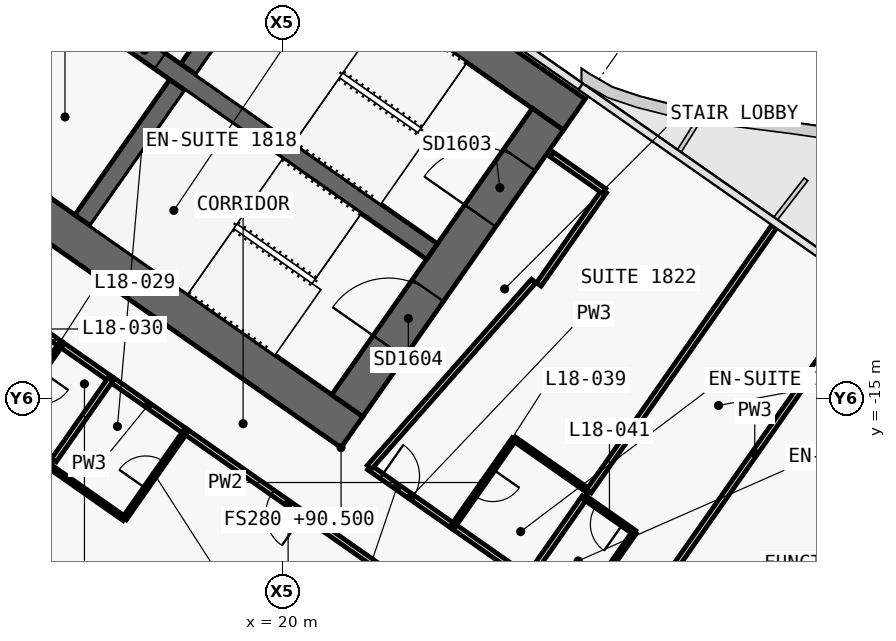
"""IFC4 building model, lengths in metres.
Left out: names, types, materials, properties, quantities, classifications, styles, units other than length and angle.
Written with IfcOpenShell. Run it as: python <this file> out.ifc"""

import sys

from ifc_helpers import new_model, si_unit, direction, frame, frame_2d, origin, place, context, subcontext, project, spatial, polyline, rectangle, outline, extrude, element, fill, save


model = new_model("IFC4")
c1 = context("Model", 3, precision=1e-05, world=origin(), true_north=direction((0.0, 1.0)))
c2 = subcontext(c1, "Body", "Model", "MODEL_VIEW")
j1 = project(units=[si_unit("LENGTHUNIT", "METRE"), si_unit("PLANEANGLEUNIT", "RADIAN")], contexts=[c1])
p1 = place(None, origin())
s1 = spatial("IfcSite", under=j1, at=p1, CompositionType="ELEMENT")
p2 = place(p1, origin())
s2 = spatial("IfcBuilding", under=s1, at=p2, CompositionType="ELEMENT")
p3 = place(p2, frame((0.0, 0.0, 90.5)))
s3 = spatial("IfcBuildingStorey", under=s2, at=p3, CompositionType="ELEMENT", Elevation=90.5)
p4 = place(p3, frame((-0.037, 11.867, 0.0), z_axis=(0.0, 0.0, 1.0), x_axis=(0.819155306259, -0.573571777746, 0.0)))
e1 = element("IfcWall", 1, at=p4, inside=s3, PredefinedType="SHEAR", context=c2, shape_type="SweptSolid", body=[
    extrude(outline(polyline([(33.837, 0.5), (0.0, 0.5), (0.7, -0.5), (33.837, -0.5), (33.837, 0.5)])), origin(), (0.0, 0.0, 1.0), 3.6),
])
p5 = place(p3, frame((-0.037, -0.585, 0.0), z_axis=(0.0, 0.0, 1.0), x_axis=(0.819157152511, -0.573569140985, 0.0)))
e2 = element("IfcWall", 2, at=p5, inside=s3, PredefinedType="SHEAR", context=c2, shape_type="SweptSolid", body=[
    extrude(outline(polyline([(26.695, 0.5), (0.0, 0.5), (0.7, -0.5), (26.695, -0.5), (26.695, 0.5)])), origin(), (0.0, 0.0, 1.0), 3.6),
])
p6 = place(p5, frame((1.045, 0.0, 0.0)))
e3 = element("IfcOpeningElement", 3, at=p6, cuts=e2, PredefinedType="OPENING", context=c2, shape_type="SweptSolid", body=[
    extrude(rectangle(XDim=1.5, YDim=2.1, at=frame_2d((0.75, 1.05))), frame((0.0, 0.51, 0.0), z_axis=(0.0, -1.0, 0.0), x_axis=(1.0, 0.0, 0.0)), (0.0, 0.0, 1.0), 1.02),
])
p7 = place(p5, frame((12.445, 0.0, 0.0)))
e4 = element("IfcOpeningElement", 4, at=p7, cuts=e2, PredefinedType="OPENING", context=c2, shape_type="SweptSolid", body=[
    extrude(rectangle(XDim=1.5, YDim=2.1, at=frame_2d((0.75, 1.05))), frame((0.0, 0.51, 0.0), z_axis=(0.0, -1.0, 0.0), x_axis=(1.0, 0.0, 0.0)), (0.0, 0.0, 1.0), 1.02),
])
p8 = place(p3, frame((21.708, -15.2, 0.0), z_axis=(0.0, 0.0, 1.0), x_axis=(0.573576324356, 0.819152122709, 0.0)))
e5 = element("IfcWall", 5, at=p8, inside=s3, PredefinedType="SHEAR", context=c2, shape_type="SweptSolid", body=[
    extrude(outline(polyline([(9.2, 0.5), (0.0, 0.5), (0.0, -0.5), (9.2, -0.5), (9.2, 0.5)])), origin(), (0.0, 0.0, 1.0), 3.6),
])
p9 = place(p8, frame((6.1, 0.0, 0.0)))
e6 = element("IfcOpeningElement", 6, at=p9, cuts=e5, PredefinedType="OPENING", context=c2, shape_type="SweptSolid", body=[
    extrude(rectangle(XDim=1.8, YDim=2.1, at=frame_2d((0.9, 1.05))), frame((0.0, 0.51, 0.0), z_axis=(0.0, -1.0, 0.0), x_axis=(1.0, 0.0, 0.0)), (0.0, 0.0, 1.0), 1.02),
])
p10 = place(p8, frame((1.9, 0.0, 0.0)))
e7 = element("IfcOpeningElement", 7, at=p10, cuts=e5, PredefinedType="OPENING", context=c2, shape_type="SweptSolid", body=[
    extrude(rectangle(XDim=1.8, YDim=2.1, at=frame_2d((0.9, 1.05))), frame((0.0, 0.51, 0.0), z_axis=(0.0, -1.0, 0.0), x_axis=(1.0, 0.0, 0.0)), (0.0, 0.0, 1.0), 1.02),
])
p11 = place(p3, frame((14.745, -10.324, 0.0), z_axis=(0.0, 0.0, 1.0), x_axis=(0.57356780395, 0.819158088694, 0.0)))
e8 = element("IfcWall", 8, at=p11, inside=s3, PredefinedType="SHEAR", context=c2, shape_type="SweptSolid", body=[
    extrude(outline(polyline([(0.0, 0.25), (0.0, -0.25), (4.35, -0.25), (4.35, 0.25), (0.0, 0.25)])), origin(), (0.0, 0.0, 1.0), 3.6),
])
p12 = place(p3, frame((17.527, -6.352, 0.0), z_axis=(0.0, 0.0, 1.0), x_axis=(0.573530143085, 0.819184457233, 0.0)))
e9 = element("IfcWall", 9, at=p12, inside=s3, PredefinedType="SHEAR", context=c2, shape_type="SweptSolid", body=[
    extrude(outline(polyline([(4.35, -0.25), (4.35, 0.25), (0.0, 0.25), (0.0, -0.25), (4.35, -0.25)])), origin(), (0.0, 0.0, 1.0), 3.6),
])
p13 = place(p3, frame((2.638, 3.768, 0.0), z_axis=(0.0, 0.0, 1.0), x_axis=(0.819148977158, -0.573580816643, 0.0)))
e10 = element("IfcWall", 10, at=p13, inside=s3, PredefinedType="SHEAR", context=c2, shape_type="SweptSolid", body=[
    extrude(outline(polyline([(0.0, 0.25), (0.0, -0.25), (26.0, -0.25), (26.0, 0.25), (0.0, 0.25)])), origin(), (0.0, 0.0, 1.0), 3.6),
])
p14 = place(p13, frame((9.637, 0.0, 0.0)))
e11 = element("IfcOpeningElement", 11, at=p14, cuts=e10, PredefinedType="OPENING", context=c2, shape_type="SweptSolid", body=[
    extrude(rectangle(XDim=1.2, YDim=2.1, at=frame_2d((0.6, 1.05))), frame((0.0, 0.26, 0.0), z_axis=(0.0, -1.0, 0.0), x_axis=(1.0, 0.0, 0.0)), (0.0, 0.0, 1.0), 0.52),
])
p15 = place(p13, frame((11.812, 0.0, 0.0)))
e12 = element("IfcOpeningElement", 12, at=p15, cuts=e10, PredefinedType="OPENING", context=c2, shape_type="SweptSolid", body=[
    extrude(rectangle(XDim=1.2, YDim=2.1, at=frame_2d((0.6, 1.05))), frame((0.0, 0.26, 0.0), z_axis=(0.0, -1.0, 0.0), x_axis=(1.0, 0.0, 0.0)), (0.0, 0.0, 1.0), 0.52),
])
p16 = place(p13, frame((13.988, 0.0, 0.0)))
e13 = element("IfcOpeningElement", 13, at=p16, cuts=e10, PredefinedType="OPENING", context=c2, shape_type="SweptSolid", body=[
    extrude(rectangle(XDim=1.2, YDim=2.1, at=frame_2d((0.6, 1.05))), frame((0.0, 0.26, 0.0), z_axis=(0.0, -1.0, 0.0), x_axis=(1.0, 0.0, 0.0)), (0.0, 0.0, 1.0), 0.52),
])
p17 = place(p13, frame((16.262, 0.0, 0.0)))
e14 = element("IfcOpeningElement", 14, at=p17, cuts=e10, PredefinedType="OPENING", context=c2, shape_type="SweptSolid", body=[
    extrude(rectangle(XDim=1.0, YDim=2.1, at=frame_2d((0.5, 1.05))), frame((0.0, 0.26, 0.0), z_axis=(0.0, -1.0, 0.0), x_axis=(1.0, 0.0, 0.0)), (0.0, 0.0, 1.0), 0.52),
])
p18 = place(p3, frame((22.284, -16.824, 0.0), z_axis=(0.0, 0.0, 1.0), x_axis=(0.819176640776, -0.573541307325, 0.0)))
e15 = element("IfcWall", 15, at=p18, inside=s3, PredefinedType="PARTITIONING", context=c2, shape_type="SweptSolid", body=[
    extrude(rectangle(XDim=2.698, YDim=0.15, at=frame_2d((1.349, 0.0))), origin(), (0.0, 0.0, 1.0), 3.32),
])
p19 = place(p18, frame((0.396, 0.0, 0.0)))
e16 = element("IfcOpeningElement", 16, at=p19, cuts=e15, PredefinedType="OPENING", context=c2, shape_type="SweptSolid", body=[
    extrude(rectangle(XDim=1.0, YDim=2.1, at=frame_2d((0.5, 1.05))), frame((0.0, 0.085, 0.0), z_axis=(0.0, -1.0, 0.0), x_axis=(1.0, 0.0, 0.0)), (0.0, 0.0, 1.0), 0.17),
])
p20 = place(p3, frame((24.491, -18.369, 0.0), z_axis=(0.0, 0.0, 1.0), x_axis=(0.819179439794, -0.573537309527, 0.0)))
e17 = element("IfcWall", 17, at=p20, inside=s3, PredefinedType="PARTITIONING", context=c2, shape_type="SweptSolid", body=[
    extrude(rectangle(XDim=2.404, YDim=0.15, at=frame_2d((1.202, 0.0))), origin(), (0.0, 0.0, 1.0), 3.32),
])
p21 = place(p3, frame((14.172, -13.585, 0.0), z_axis=(0.0, 0.0, 1.0), x_axis=(-0.81914197737, 0.573590813132, 0.0)))
e18 = element("IfcWall", 18, at=p21, inside=s3, PredefinedType="PARTITIONING", context=c2, shape_type="SweptSolid", body=[
    extrude(rectangle(XDim=1.403, YDim=0.15, at=frame_2d((0.701, 0.0))), origin(), (0.0, 0.0, 1.0), 2.6),
])
p22 = place(p21, frame((0.201, 0.0, 0.0)))
e19 = element("IfcOpeningElement", 19, at=p22, cuts=e18, PredefinedType="OPENING", context=c2, shape_type="SweptSolid", body=[
    extrude(rectangle(XDim=1.0, YDim=2.1, at=frame_2d((0.5, 1.05))), frame((0.0, 0.085, 0.0), z_axis=(0.0, -1.0, 0.0), x_axis=(1.0, 0.0, 0.0)), (0.0, 0.0, 1.0), 0.17),
])
p23 = place(p3, frame((15.483, -14.504, 0.0), z_axis=(0.0, 0.0, 1.0), x_axis=(-0.819189013667, 0.573523634986, 0.0)))
e20 = element("IfcWall", 20, at=p23, inside=s3, PredefinedType="PARTITIONING", context=c2, shape_type="SweptSolid", body=[
    extrude(rectangle(XDim=1.604, YDim=0.15, at=frame_2d((0.802, 0.0))), origin(), (0.0, 0.0, 1.0), 3.32),
])
p24 = place(p3, frame((22.855, -19.666, 0.0), z_axis=(0.0, 0.0, 1.0), x_axis=(-0.819153746897, 0.573574004767, 0.0)))
e21 = element("IfcWall", 21, at=p24, inside=s3, PredefinedType="PARTITIONING", context=c2, shape_type="SweptSolid", body=[
    extrude(rectangle(XDim=6.603, YDim=0.15, at=frame_2d((3.302, 0.0))), origin(), (0.0, 0.0, 1.0), 2.6),
])
p25 = place(p24, frame((2.802, 0.0, 0.0)))
e22 = element("IfcOpeningElement", 22, at=p25, cuts=e21, PredefinedType="OPENING", context=c2, shape_type="SweptSolid", body=[
    extrude(rectangle(XDim=1.0, YDim=2.1, at=frame_2d((0.5, 1.05))), frame((0.0, 0.085, 0.0), z_axis=(0.0, -1.0, 0.0), x_axis=(1.0, 0.0, 0.0)), (0.0, 0.0, 1.0), 0.17),
])
p26 = place(p3, frame((17.449, -15.88, 0.0), z_axis=(0.0, 0.0, 1.0), x_axis=(-0.819179439794, 0.573537309527, 0.0)))
e23 = element("IfcWall", 23, at=p26, inside=s3, PredefinedType="PARTITIONING", context=c2, shape_type="SweptSolid", body=[
    extrude(rectangle(XDim=2.404, YDim=0.15, at=frame_2d((1.202, 0.0))), origin(), (0.0, 0.0, 1.0), 3.32),
])
p27 = place(p3, frame((26.098, -16.076, 0.0), z_axis=(0.0, 0.0, 1.0), x_axis=(-0.573550118428, -0.819170471667, 0.0)))
e24 = element("IfcWall", 24, at=p27, inside=s3, PredefinedType="PARTITIONING", context=c2, shape_type="SweptSolid", body=[
    extrude(rectangle(XDim=2.8, YDim=0.12, at=frame_2d((1.4, 0.0))), origin(), (0.0, 0.0, 1.0), 2.6),
])
p28 = place(p27, frame((0.975, 0.0, 0.0)))
e25 = element("IfcOpeningElement", 25, at=p28, cuts=e24, PredefinedType="OPENING", context=c2, shape_type="SweptSolid", body=[
    extrude(rectangle(XDim=0.85, YDim=2.05, at=frame_2d((0.425, 1.025))), frame((0.0, 0.07, 0.0), z_axis=(0.0, -1.0, 0.0), x_axis=(1.0, 0.0, 0.0)), (0.0, 0.0, 1.0), 0.14),
])
p29 = place(p3, frame((28.065, -17.453, 0.0), z_axis=(0.0, 0.0, 1.0), x_axis=(-0.819155442668, 0.573571582932, 0.0)))
e26 = element("IfcWall", 26, at=p29, inside=s3, PredefinedType="PARTITIONING", context=c2, shape_type="SweptSolid", body=[
    extrude(rectangle(XDim=2.4, YDim=0.12, at=frame_2d((1.2, 0.0))), origin(), (0.0, 0.0, 1.0), 3.32),
])
p30 = place(p3, frame((32.94, -10.491, 0.0), z_axis=(0.0, 0.0, 1.0), x_axis=(-0.573593433868, -0.819140142237, 0.0)))
e27 = element("IfcWall", 27, at=p30, inside=s3, PredefinedType="PARTITIONING", context=c2, shape_type="SweptSolid", body=[
    extrude(rectangle(XDim=8.499, YDim=0.15, at=frame_2d((4.25, 0.0))), origin(), (0.0, 0.0, 1.0), 2.6),
])
p31 = place(p3, frame((22.285, -16.825, 0.0), z_axis=(0.0, 0.0, 1.0), x_axis=(0.661551268245, 0.749899939647, 0.0)))
e28 = element("IfcWall", 28, at=p31, inside=s3, PredefinedType="PARTITIONING", context=c2, shape_type="SweptSolid", body=[
    extrude(rectangle(XDim=6.541, YDim=0.15, at=frame_2d((3.271, 0.0))), origin(), (0.0, 0.0, 1.0), 2.6),
])
p32 = place(p3, frame((26.746, -12.014, 0.0), z_axis=(0.0, 0.0, 1.0), x_axis=(0.573560650686, 0.819163097304, 0.0)))
e29 = element("IfcWall", 29, at=p32, inside=s3, PredefinedType="PARTITIONING", context=c2, shape_type="SweptSolid", body=[
    extrude(rectangle(XDim=3.0, YDim=0.15, at=frame_2d((1.5, 0.0))), origin(), (0.0, 0.0, 1.0), 3.32),
])
p33 = place(p3, frame((28.467, -9.556, 0.0), z_axis=(0.0, 0.0, 1.0), x_axis=(-0.819109000826, 0.573637903879, 0.0)))
e30 = element("IfcWall", 30, at=p33, inside=s3, PredefinedType="PARTITIONING", context=c2, shape_type="SweptSolid", body=[
    extrude(rectangle(XDim=1.68, YDim=0.15, at=frame_2d((0.84, 0.0))), origin(), (0.0, 0.0, 1.0), 3.32),
])
p34 = place(p3, frame((27.951, -17.616, 0.0), z_axis=(0.0, 0.0, 1.0), x_axis=(-0.573544201094, -0.819174614714, 0.0)))
e31 = element("IfcWall", 31, at=p34, inside=s3, PredefinedType="PARTITIONING", context=c2, shape_type="SweptSolid", body=[
    extrude(rectangle(XDim=2.602, YDim=0.15, at=frame_2d((1.301, 0.0))), origin(), (0.0, 0.0, 1.0), 2.6),
])
p35 = place(p3, frame((27.77, -20.666, 0.0), z_axis=(0.0, 0.0, 1.0), x_axis=(0.573537965655, 0.819178980414, 0.0)))
e32 = element("IfcWall", 32, at=p35, inside=s3, PredefinedType="PARTITIONING", context=c2, shape_type="SweptSolid", body=[
    extrude(rectangle(XDim=2.6, YDim=0.12, at=frame_2d((1.3, 0.0))), origin(), (0.0, 0.0, 1.0), 2.6),
])
p36 = place(p3, frame((29.261, -18.534, 0.0), z_axis=(0.0, 0.0, 1.0), x_axis=(-0.819253425856, 0.573431621227, 0.0)))
e33 = element("IfcWall", 33, at=p36, inside=s3, PredefinedType="PARTITIONING", context=c2, shape_type="SweptSolid", body=[
    extrude(rectangle(XDim=1.6, YDim=0.12, at=frame_2d((0.8, 0.0))), origin(), (0.0, 0.0, 1.0), 3.32),
])
p37 = place(p36, frame((0.375, 0.0, 0.0)))
e34 = element("IfcOpeningElement", 34, at=p37, cuts=e33, PredefinedType="OPENING", context=c2, shape_type="SweptSolid", body=[
    extrude(rectangle(XDim=0.85, YDim=2.05, at=frame_2d((0.425, 1.025))), frame((0.0, 0.07, 0.0), z_axis=(0.0, -1.0, 0.0), x_axis=(1.0, 0.0, 0.0)), (0.0, 0.0, 1.0), 0.14),
])
p38 = place(p3, frame((35.013, -12.76, 0.0), z_axis=(0.0, 0.0, 1.0), x_axis=(-0.573558725113, -0.819164445546, 0.0)))
e35 = element("IfcWall", 35, at=p38, inside=s3, PredefinedType="PARTITIONING", context=c2, shape_type="SweptSolid", body=[
    extrude(rectangle(XDim=9.01, YDim=0.15, at=frame_2d((4.505, 0.0))), origin(), (0.0, 0.0, 1.0), 2.6),
])
p39 = place(p3, frame((14.17, -13.584, 0.0), z_axis=(0.0, 0.0, 1.0), x_axis=(-0.573537965655, -0.819178980414, 0.0)))
e36 = element("IfcWall", 36, at=p39, inside=s3, PredefinedType="PARTITIONING", context=c2, shape_type="SweptSolid", body=[
    extrude(rectangle(XDim=2.6, YDim=0.12, at=frame_2d((1.3, 0.0))), origin(), (0.0, 0.0, 1.0), 3.32),
])
p40 = place(p39, frame((0.875, 0.0, 0.0)))
e37 = element("IfcOpeningElement", 37, at=p40, cuts=e36, PredefinedType="OPENING", context=c2, shape_type="SweptSolid", body=[
    extrude(rectangle(XDim=0.85, YDim=2.05, at=frame_2d((0.425, 1.025))), frame((0.0, 0.07, 0.0), z_axis=(0.0, -1.0, 0.0), x_axis=(1.0, 0.0, 0.0)), (0.0, 0.0, 1.0), 0.14),
])
p41 = place(p3, frame((12.679, -15.716, 0.0), z_axis=(0.0, 0.0, 1.0), x_axis=(0.819131543282, -0.57360571371, 0.0)))
e38 = element("IfcWall", 38, at=p41, inside=s3, PredefinedType="PARTITIONING", context=c2, shape_type="SweptSolid", body=[
    extrude(rectangle(XDim=1.6, YDim=0.12, at=frame_2d((0.8, 0.0))), origin(), (0.0, 0.0, 1.0), 3.32),
])
p42 = place(p3, frame((15.481, -14.503, 0.0), z_axis=(0.0, 0.0, 1.0), x_axis=(-0.573582085028, -0.819148089014, 0.0)))
e39 = element("IfcWall", 39, at=p42, inside=s3, PredefinedType="PARTITIONING", context=c2, shape_type="SweptSolid", body=[
    extrude(rectangle(XDim=2.6, YDim=0.15, at=frame_2d((1.3, 0.0))), origin(), (0.0, 0.0, 1.0), 3.32),
])
p43 = place(p3, frame((13.875, -16.797, 0.0), z_axis=(0.0, 0.0, 1.0), x_axis=(0.819155442668, -0.573571582932, 0.0)))
e40 = element("IfcWall", 40, at=p43, inside=s3, PredefinedType="PARTITIONING", context=c2, shape_type="SweptSolid", body=[
    extrude(rectangle(XDim=2.4, YDim=0.12, at=frame_2d((1.2, 0.0))), origin(), (0.0, 0.0, 1.0), 3.32),
])
p44 = place(p3, frame((15.842, -18.173, 0.0), z_axis=(0.0, 0.0, 1.0), x_axis=(0.573550118428, 0.819170471667, 0.0)))
e41 = element("IfcWall", 41, at=p44, inside=s3, PredefinedType="PARTITIONING", context=c2, shape_type="SweptSolid", body=[
    extrude(rectangle(XDim=2.8, YDim=0.12, at=frame_2d((1.4, 0.0))), origin(), (0.0, 0.0, 1.0), 3.32),
])
p45 = place(p44, frame((0.975, 0.0, 0.0)))
e42 = element("IfcOpeningElement", 42, at=p45, cuts=e41, PredefinedType="OPENING", context=c2, shape_type="SweptSolid", body=[
    extrude(rectangle(XDim=0.85, YDim=2.05, at=frame_2d((0.425, 1.025))), frame((0.0, 0.07, 0.0), z_axis=(0.0, -1.0, 0.0), x_axis=(1.0, 0.0, 0.0)), (0.0, 0.0, 1.0), 0.14),
])
p46 = place(p17, origin())
e43 = element("IfcDoor", 43, at=p46, inside=s3, OperationType="SINGLE_SWING_RIGHT", PredefinedType="DOOR", context=c2, shape_type="SweptSolid", body=[
    extrude(rectangle(XDim=1.0, YDim=2.1, at=frame_2d((0.5, 1.05))), frame((0.0, 0.025, 0.0), z_axis=(0.0, -1.0, 0.0), x_axis=(1.0, 0.0, 0.0)), (0.0, 0.0, 1.0), 0.05),
])
fill(e14, e43)
p47 = place(p9, origin())
e44 = element("IfcDoor", 44, at=p47, inside=s3, OperationType="DOUBLE_DOOR_SINGLE_SWING", PredefinedType="DOOR", context=c2, shape_type="SweptSolid", body=[
    extrude(rectangle(XDim=1.8, YDim=2.1, at=frame_2d((0.9, 1.05))), frame((0.0, 0.025, 0.0), z_axis=(0.0, -1.0, 0.0), x_axis=(1.0, 0.0, 0.0)), (0.0, 0.0, 1.0), 0.05),
])
fill(e6, e44)
p48 = place(p10, origin())
e45 = element("IfcDoor", 45, at=p48, inside=s3, OperationType="DOUBLE_DOOR_SINGLE_SWING", PredefinedType="DOOR", context=c2, shape_type="SweptSolid", body=[
    extrude(rectangle(XDim=1.8, YDim=2.1, at=frame_2d((0.9, 1.05))), frame((0.0, 0.025, 0.0), z_axis=(0.0, -1.0, 0.0), x_axis=(1.0, 0.0, 0.0)), (0.0, 0.0, 1.0), 0.05),
])
fill(e7, e45)
p49 = place(p22, origin())
e46 = element("IfcDoor", 46, at=p49, inside=s3, OperationType="SINGLE_SWING_LEFT", PredefinedType="DOOR", context=c2, shape_type="SweptSolid", body=[
    extrude(rectangle(XDim=1.0, YDim=2.1, at=frame_2d((0.5, 1.05))), frame((0.0, 0.025, 0.0), z_axis=(0.0, -1.0, 0.0), x_axis=(1.0, 0.0, 0.0)), (0.0, 0.0, 1.0), 0.05),
])
fill(e19, e46)
p50 = place(p45, origin())
e47 = element("IfcDoor", 47, at=p50, inside=s3, OperationType="SINGLE_SWING_LEFT", PredefinedType="DOOR", context=c2, shape_type="SweptSolid", body=[
    extrude(rectangle(XDim=0.85, YDim=2.05, at=frame_2d((0.425, 1.025))), frame((0.0, 0.025, 0.0), z_axis=(0.0, -1.0, 0.0), x_axis=(1.0, 0.0, 0.0)), (0.0, 0.0, 1.0), 0.05),
])
fill(e42, e47)
p51 = place(p25, origin())
e48 = element("IfcDoor", 48, at=p51, inside=s3, OperationType="SINGLE_SWING_LEFT", PredefinedType="DOOR", context=c2, shape_type="SweptSolid", body=[
    extrude(rectangle(XDim=1.0, YDim=2.1, at=frame_2d((0.5, 1.05))), frame((0.0, 0.025, 0.0), z_axis=(0.0, -1.0, 0.0), x_axis=(1.0, 0.0, 0.0)), (0.0, 0.0, 1.0), 0.05),
])
fill(e22, e48)
p52 = place(p28, origin())
e49 = element("IfcDoor", 49, at=p52, inside=s3, OperationType="SINGLE_SWING_LEFT", PredefinedType="DOOR", context=c2, shape_type="SweptSolid", body=[
    extrude(rectangle(XDim=0.85, YDim=2.05, at=frame_2d((0.425, 1.025))), frame((0.0, 0.025, 0.0), z_axis=(0.0, -1.0, 0.0), x_axis=(1.0, 0.0, 0.0)), (0.0, 0.0, 1.0), 0.05),
])
fill(e25, e49)
p53 = place(p19, origin())
e50 = element("IfcDoor", 50, at=p53, inside=s3, OperationType="SINGLE_SWING_RIGHT", PredefinedType="DOOR", context=c2, shape_type="SweptSolid", body=[
    extrude(rectangle(XDim=1.0, YDim=2.1, at=frame_2d((0.5, 1.05))), frame((0.0, 0.025, 0.0), z_axis=(0.0, -1.0, 0.0), x_axis=(1.0, 0.0, 0.0)), (0.0, 0.0, 1.0), 0.05),
])
fill(e16, e50)
p54 = place(p37, origin())
e51 = element("IfcDoor", 51, at=p54, inside=s3, OperationType="SINGLE_SWING_LEFT", PredefinedType="DOOR", context=c2, shape_type="SweptSolid", body=[
    extrude(rectangle(XDim=0.85, YDim=2.05, at=frame_2d((0.425, 1.025))), frame((0.0, 0.025, 0.0), z_axis=(0.0, -1.0, 0.0), x_axis=(1.0, 0.0, 0.0)), (0.0, 0.0, 1.0), 0.05),
])
fill(e34, e51)
save(model, sys.argv[1])
